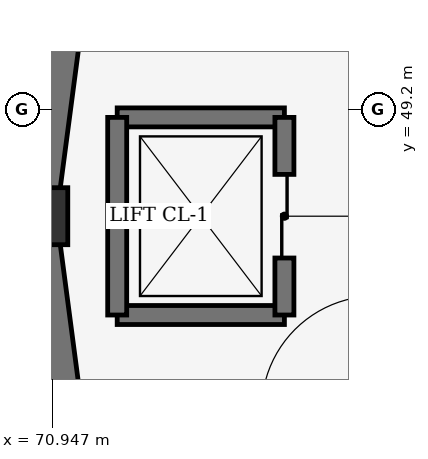
"""IFC4 building model, lengths in metres.
Left out: names, types, materials, properties, quantities, classifications, styles, units other than length and angle.
Written with IfcOpenShell. Run it as: python <this file> out.ifc"""

import sys

from ifc_helpers import new_model, si_unit, direction, frame, frame_2d, origin, origin_2d, place, context, subcontext, project, spatial, rectangle, extrude, element, fill, save


model = new_model("IFC4")
c1 = context("Model", 3, precision=1e-05, world=origin(), true_north=direction((0.0, 1.0)))
c2 = subcontext(c1, "Body", "Model", "MODEL_VIEW")
j1 = project(units=[si_unit("LENGTHUNIT", "METRE"), si_unit("PLANEANGLEUNIT", "RADIAN")], contexts=[c1])
p1 = place(None, origin())
s1 = spatial("IfcSite", under=j1, at=p1, CompositionType="ELEMENT")
p2 = place(p1, origin())
s2 = spatial("IfcBuilding", under=s1, at=p2, CompositionType="ELEMENT")
p3 = place(p2, frame((0.0, 0.0, -4.8)))
s3 = spatial("IfcBuildingStorey", under=s2, at=p3, CompositionType="ELEMENT", Elevation=-4.8)
p4 = place(p3, frame((70.775, 47.8, 0.0), z_axis=(0.0, 0.0, 1.0), x_axis=(-1.0, 0.0, 0.0)))
e1 = element("IfcColumn", 1, at=p4, inside=s3, PredefinedType="COLUMN", context=c2, shape_type="SweptSolid", body=[
    extrude(rectangle(XDim=0.75, YDim=0.75, at=origin_2d()), origin(), (0.0, 0.0, 1.0), 4.48),
])
p5 = place(p3, frame((71.348, 52.155, 0.0), z_axis=(0.0, 0.0, 1.0), x_axis=(-0.130572419871, -0.991438774292, 0.0)))
e2 = element("IfcWall", 2, at=p5, inside=s3, PredefinedType="USERDEFINED", context=c2, shape_type="SweptSolid", body=[
    extrude(rectangle(XDim=4.392, YDim=0.45, at=frame_2d((2.196, 0.0))), origin(), (0.0, 0.0, 1.0), 4.48),
])
p6 = place(p3, frame((70.775, 47.8, 0.0), z_axis=(0.0, 0.0, 1.0), x_axis=(0.130565224353, -0.991439721914, 0.0)))
e3 = element("IfcWall", 3, at=p6, inside=s3, PredefinedType="USERDEFINED", context=c2, shape_type="SweptSolid", body=[
    extrude(rectangle(XDim=4.392, YDim=0.45, at=frame_2d((2.196, 0.0))), origin(), (0.0, 0.0, 1.0), 4.48),
])
for number, where, z_axis, x_axis in (
    (4, (71.8, 46.5, 0.0), (0.0, 0.0, 1.0), (1.0, 0.0, 0.0)),
    (5, (71.8, 49.1, 0.0), (0.0, 0.0, 1.0), (1.0, 0.0, 0.0)),
):
    element("IfcWall", number, at=place(p3, frame(where, z_axis=z_axis, x_axis=x_axis)), inside=s3, PredefinedType="SHEAR", context=c2, shape_type="SweptSolid", body=[
        extrude(rectangle(XDim=2.2, YDim=0.25, at=frame_2d((1.1, 0.0))), origin(), (0.0, 0.0, 1.0), 4.5),
    ])
p7 = place(p3, frame((71.8, 46.5, 0.0), z_axis=(0.0, 0.0, 1.0), x_axis=(0.0, 1.0, 0.0)))
e6 = element("IfcWall", 6, at=p7, inside=s3, PredefinedType="SHEAR", context=c2, shape_type="SweptSolid", body=[
    extrude(rectangle(XDim=2.6, YDim=0.25, at=frame_2d((1.3, 0.0))), origin(), (0.0, 0.0, 1.0), 4.5),
])
p8 = place(p3, frame((74.0, 46.5, 0.0), z_axis=(0.0, 0.0, 1.0), x_axis=(0.0, 1.0, 0.0)))
e7 = element("IfcWall", 7, at=p8, inside=s3, PredefinedType="SHEAR", context=c2, shape_type="SweptSolid", body=[
    extrude(rectangle(XDim=2.6, YDim=0.25, at=frame_2d((1.3, 0.0))), origin(), (0.0, 0.0, 1.0), 4.5),
])
p9 = place(p8, frame((0.75, 0.0, 0.0)))
e8 = element("IfcOpeningElement", 8, at=p9, cuts=e7, PredefinedType="OPENING", context=c2, shape_type="SweptSolid", body=[
    extrude(rectangle(XDim=1.1, YDim=2.2, at=frame_2d((0.55, 1.1))), frame((0.0, 0.135, 0.0), z_axis=(0.0, -1.0, 0.0), x_axis=(1.0, 0.0, 0.0)), (0.0, 0.0, 1.0), 0.27),
])
p10 = place(p9, origin())
e9 = element("IfcDoor", 9, at=p10, inside=s3, OperationType="DOUBLE_DOOR_SLIDING", PredefinedType="DOOR", context=c2, shape_type="SweptSolid", body=[
    extrude(rectangle(XDim=1.1, YDim=2.2, at=frame_2d((0.55, 1.1))), frame((0.0, 0.025, 0.0), z_axis=(0.0, -1.0, 0.0), x_axis=(1.0, 0.0, 0.0)), (0.0, 0.0, 1.0), 0.05),
])
fill(e8, e9)
save(model, sys.argv[1])
